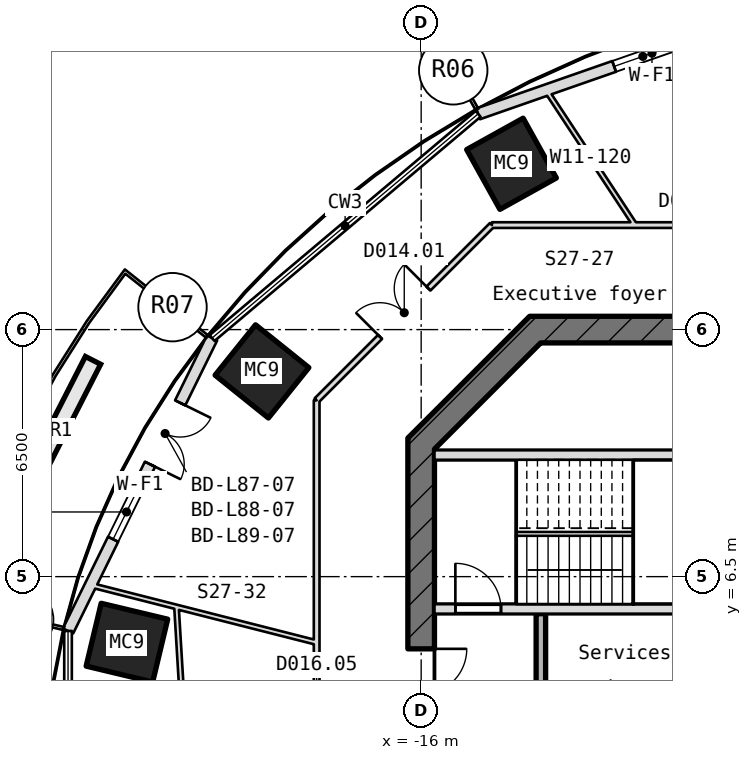
"""IFC4 building model, lengths in metres.
Left out: names, types, materials, properties, quantities, classifications, styles, units other than length and angle.
Written with IfcOpenShell. Run it as: python <this file> out.ifc"""

import sys

from ifc_helpers import new_model, si_unit, direction, frame, frame_2d, origin, origin_2d, place, context, subcontext, project, spatial, rectangle, hollow_rectangle, extrude, element, fill, save


model = new_model("IFC4")
c1 = context("Model", 3, precision=1e-05, world=origin(), true_north=direction((0.0, 1.0)))
c2 = subcontext(c1, "Body", "Model", "MODEL_VIEW")
j1 = project(units=[si_unit("LENGTHUNIT", "METRE"), si_unit("PLANEANGLEUNIT", "RADIAN")], contexts=[c1])
p1 = place(None, origin())
s1 = spatial("IfcSite", under=j1, at=p1, CompositionType="ELEMENT")
p2 = place(p1, origin())
s2 = spatial("IfcBuilding", under=s1, at=p2, CompositionType="ELEMENT")
p3 = place(p2, frame((0.0, 0.0, 384.1)))
s3 = spatial("IfcBuildingStorey", under=s2, at=p3, CompositionType="ELEMENT", Elevation=384.1)
for number, where, z_axis, x_axis in (
    (1, (-13.623, 17.363, -0.18), (0.0, 0.0, 1.0), (0.874, 0.486, 0.0)),
    (2, (-20.189, 11.9, -0.18), (0.0, 0.0, 1.0), (0.626, 0.78, 0.0)),
    (3, (-23.743, 4.763, -0.18), (0.0, 0.0, 1.0), (0.233, 0.973, 0.0)),
):
    element("IfcColumn", number, at=place(p3, frame(where, z_axis=z_axis, x_axis=x_axis)), inside=s3, PredefinedType="COLUMN", context=c2, shape_type="SweptSolid", body=[
        extrude(hollow_rectangle(XDim=1.7, YDim=1.8, WallThickness=0.05, at=origin_2d()), origin(), (0.0, 0.0, 1.0), 4.15),
    ])
p4 = place(p3, frame((-5.351, 21.869, 0.0), z_axis=(0.0, 0.0, 1.0), x_axis=(-0.944174121216, -0.329446852809, 0.0)))
e4 = element("IfcWall", 4, at=p4, inside=s3, PredefinedType="SOLIDWALL", context=c2, shape_type="SweptSolid", body=[
    extrude(rectangle(XDim=9.69, YDim=0.3, at=frame_2d((4.845, 0.0))), origin(), (0.0, 0.0, 1.0), 3.97),
])
p5 = place(p4, frame((1.9, 0.0, 0.0)))
e5 = element("IfcOpeningElement", 5, at=p5, cuts=e4, PredefinedType="OPENING", context=c2, shape_type="SweptSolid", body=[
    extrude(rectangle(XDim=1.8, YDim=2.4, at=frame_2d((0.9, 1.2))), frame((0.0, 0.16, 0.0), z_axis=(0.0, -1.0, 0.0), x_axis=(1.0, 0.0, 0.0)), (0.0, 0.0, 1.0), 0.32),
])
p6 = place(p4, frame((4.3, 0.0, 0.9)))
e6 = element("IfcOpeningElement", 6, at=p6, cuts=e4, PredefinedType="OPENING", context=c2, shape_type="SweptSolid", body=[
    extrude(rectangle(XDim=1.6, YDim=1.5, at=frame_2d((0.8, 0.75))), frame((0.0, 0.16, 0.0), z_axis=(0.0, -1.0, 0.0), x_axis=(1.0, 0.0, 0.0)), (0.0, 0.0, 1.0), 0.32),
])
p7 = place(p3, frame((-21.503, 12.778, 0.0), z_axis=(0.0, 0.0, 1.0), x_axis=(-0.441245353493, -0.897386504256, 0.0)))
e7 = element("IfcWall", 7, at=p7, inside=s3, PredefinedType="SOLIDWALL", context=c2, shape_type="SweptSolid", body=[
    extrude(rectangle(XDim=8.588, YDim=0.3, at=frame_2d((4.294, 0.0))), origin(), (0.0, 0.0, 1.0), 3.97),
])
p8 = place(p7, frame((1.9, 0.0, 0.0)))
e8 = element("IfcOpeningElement", 8, at=p8, cuts=e7, PredefinedType="OPENING", context=c2, shape_type="SweptSolid", body=[
    extrude(rectangle(XDim=1.8, YDim=2.4, at=frame_2d((0.9, 1.2))), frame((0.0, 0.16, 0.0), z_axis=(0.0, -1.0, 0.0), x_axis=(1.0, 0.0, 0.0)), (0.0, 0.0, 1.0), 0.32),
])
p9 = place(p7, frame((4.3, 0.0, 0.9)))
e9 = element("IfcOpeningElement", 9, at=p9, cuts=e7, PredefinedType="OPENING", context=c2, shape_type="SweptSolid", body=[
    extrude(rectangle(XDim=1.6, YDim=1.5, at=frame_2d((0.8, 0.75))), frame((0.0, 0.16, 0.0), z_axis=(0.0, -1.0, 0.0), x_axis=(1.0, 0.0, 0.0)), (0.0, 0.0, 1.0), 0.32),
])
p10 = place(p3, frame((13.145, 13.0, -0.18), z_axis=(0.0, 0.0, 1.0), x_axis=(-1.0, 0.0, 0.0)))
e10 = element("IfcWall", 10, at=p10, inside=s3, PredefinedType="SHEAR", context=c2, shape_type="SweptSolid", body=[
    extrude(rectangle(XDim=26.29, YDim=0.7, at=frame_2d((13.145, 0.0))), origin(), (0.0, 0.0, 1.0), 4.15),
])
p11 = place(p10, frame((21.073, 0.0, 0.18)))
e11 = element("IfcOpeningElement", 11, at=p11, cuts=e10, PredefinedType="OPENING", context=c2, shape_type="SweptSolid", body=[
    extrude(rectangle(XDim=1.0, YDim=2.1, at=frame_2d((0.5, 1.05))), frame((0.0, 0.36, 0.0), z_axis=(0.0, -1.0, 0.0), x_axis=(1.0, 0.0, 0.0)), (0.0, 0.0, 1.0), 0.72),
])
p12 = place(p10, frame((13.645, 0.0, 0.18)))
e12 = element("IfcOpeningElement", 12, at=p12, cuts=e10, PredefinedType="OPENING", context=c2, shape_type="SweptSolid", body=[
    extrude(rectangle(XDim=1.0, YDim=2.1, at=frame_2d((0.5, 1.05))), frame((0.0, 0.36, 0.0), z_axis=(0.0, -1.0, 0.0), x_axis=(1.0, 0.0, 0.0)), (0.0, 0.0, 1.0), 0.72),
])
p13 = place(p10, frame((7.395, 0.0, 0.18)))
e13 = element("IfcOpeningElement", 13, at=p13, cuts=e10, PredefinedType="OPENING", context=c2, shape_type="SweptSolid", body=[
    extrude(rectangle(XDim=1.0, YDim=2.1, at=frame_2d((0.5, 1.05))), frame((0.0, 0.36, 0.0), z_axis=(0.0, -1.0, 0.0), x_axis=(1.0, 0.0, 0.0)), (0.0, 0.0, 1.0), 0.72),
])
p14 = place(p10, frame((2.4, 0.0, 0.18)))
e14 = element("IfcOpeningElement", 14, at=p14, cuts=e10, PredefinedType="OPENING", context=c2, shape_type="SweptSolid", body=[
    extrude(rectangle(XDim=1.0, YDim=2.1, at=frame_2d((0.5, 1.05))), frame((0.0, 0.36, 0.0), z_axis=(0.0, -1.0, 0.0), x_axis=(1.0, 0.0, 0.0)), (0.0, 0.0, 1.0), 0.72),
])
p15 = place(p3, frame((-12.897, 13.103, -0.18), z_axis=(0.0, 0.0, 1.0), x_axis=(-0.707106781187, -0.707106781187, 0.0)))
e15 = element("IfcWall", 15, at=p15, inside=s3, PredefinedType="SHEAR", context=c2, shape_type="SweptSolid", body=[
    extrude(rectangle(XDim=4.533, YDim=0.7, at=frame_2d((2.266, 0.0))), origin(), (0.0, 0.0, 1.0), 4.15),
])
p16 = place(p3, frame((-16.0, 10.145, -0.18), z_axis=(0.0, 0.0, 1.0), x_axis=(0.0, -1.0, 0.0)))
e16 = element("IfcWall", 16, at=p16, inside=s3, PredefinedType="SHEAR", context=c2, shape_type="SweptSolid", body=[
    extrude(rectangle(XDim=20.29, YDim=0.7, at=frame_2d((10.145, 0.0))), origin(), (0.0, 0.0, 1.0), 4.15),
])
p17 = place(p16, frame((8.945, 0.0, 0.18)))
e17 = element("IfcOpeningElement", 17, at=p17, cuts=e16, PredefinedType="OPENING", context=c2, shape_type="SweptSolid", body=[
    extrude(rectangle(XDim=2.4, YDim=2.1, at=frame_2d((1.2, 1.05))), frame((0.0, 0.36, 0.0), z_axis=(0.0, -1.0, 0.0), x_axis=(1.0, 0.0, 0.0)), (0.0, 0.0, 1.0), 0.72),
])
p18 = place(p16, frame((5.545, 0.0, 0.18)))
e18 = element("IfcOpeningElement", 18, at=p18, cuts=e16, PredefinedType="OPENING", context=c2, shape_type="SweptSolid", body=[
    extrude(rectangle(XDim=1.2, YDim=2.1, at=frame_2d((0.6, 1.05))), frame((0.0, 0.36, 0.0), z_axis=(0.0, -1.0, 0.0), x_axis=(1.0, 0.0, 0.0)), (0.0, 0.0, 1.0), 0.72),
])
p19 = place(p3, frame((-15.65, 5.65, -0.18), z_axis=(0.0, 0.0, 1.0), x_axis=(1.0, 0.0, 0.0)))
e19 = element("IfcWall", 19, at=p19, inside=s3, PredefinedType="SHEAR", context=c2, shape_type="SweptSolid", body=[
    extrude(rectangle(XDim=7.1, YDim=0.25, at=frame_2d((3.55, 0.0))), origin(), (0.0, 0.0, 1.0), 4.15),
])
p20 = place(p19, frame((0.55, 0.0, 0.18)))
e20 = element("IfcOpeningElement", 20, at=p20, cuts=e19, PredefinedType="OPENING", context=c2, shape_type="SweptSolid", body=[
    extrude(rectangle(XDim=1.2, YDim=2.1, at=frame_2d((0.6, 1.05))), frame((0.0, 0.135, 0.0), z_axis=(0.0, -1.0, 0.0), x_axis=(1.0, 0.0, 0.0)), (0.0, 0.0, 1.0), 0.27),
])
p21 = place(p3, frame((-15.65, 9.7, -0.18), z_axis=(0.0, 0.0, 1.0), x_axis=(1.0, 0.0, 0.0)))
e21 = element("IfcWall", 21, at=p21, inside=s3, PredefinedType="SHEAR", context=c2, shape_type="SweptSolid", body=[
    extrude(rectangle(XDim=7.1, YDim=0.25, at=frame_2d((3.55, 0.0))), origin(), (0.0, 0.0, 1.0), 4.15),
])
p22 = place(p3, frame((-12.85, 2.475, 0.0), z_axis=(0.0, 0.0, 1.0), x_axis=(0.0, 1.0, 0.0)))
e22 = element("IfcWall", 22, at=p22, inside=s3, PredefinedType="STANDARD", context=c2, shape_type="SweptSolid", body=[
    extrude(rectangle(XDim=3.05, YDim=0.25, at=frame_2d((1.525, 0.0))), origin(), (0.0, 0.0, 1.0), 3.97),
])
p23 = place(p3, frame((-22.438, 5.703, 0.0), z_axis=(0.0, 0.0, 1.0), x_axis=(0.060251539716, -0.998183225646, 0.0)))
e23 = element("IfcWall", 23, at=p23, inside=s3, PredefinedType="PARTITIONING", context=c2, shape_type="SweptSolid", body=[
    extrude(rectangle(XDim=8.112, YDim=0.12, at=frame_2d((4.056, 0.0))), origin(), (0.0, 0.0, 1.0), 3.97),
])
p24 = place(p3, frame((-18.75, -11.139, 0.0), z_axis=(0.0, 0.0, 1.0), x_axis=(0.0, 1.0, 0.0)))
e24 = element("IfcWall", 24, at=p24, inside=s3, PredefinedType="PARTITIONING", context=c2, shape_type="SweptSolid", body=[
    extrude(rectangle(XDim=22.278, YDim=0.15, at=frame_2d((11.139, 0.0))), origin(), (0.0, 0.0, 1.0), 3.97),
])
p25 = place(p24, frame((13.745, 0.0, 0.0)))
e25 = element("IfcOpeningElement", 25, at=p25, cuts=e24, PredefinedType="OPENING", context=c2, shape_type="SweptSolid", body=[
    extrude(rectangle(XDim=0.95, YDim=2.1, at=frame_2d((0.475, 1.05))), frame((0.0, 0.085, 0.0), z_axis=(0.0, -1.0, 0.0), x_axis=(1.0, 0.0, 0.0)), (0.0, 0.0, 1.0), 0.17),
])
p26 = place(p24, frame((10.34, 0.0, 0.0)))
e26 = element("IfcOpeningElement", 26, at=p26, cuts=e24, PredefinedType="OPENING", context=c2, shape_type="SweptSolid", body=[
    extrude(rectangle(XDim=0.95, YDim=2.1, at=frame_2d((0.475, 1.05))), frame((0.0, 0.085, 0.0), z_axis=(0.0, -1.0, 0.0), x_axis=(1.0, 0.0, 0.0)), (0.0, 0.0, 1.0), 0.17),
])
p27 = place(p3, frame((-18.75, 4.765, 0.0), z_axis=(0.0, 0.0, 1.0), x_axis=(-0.969189937919, 0.246314563589, 0.0)))
e27 = element("IfcWall", 27, at=p27, inside=s3, PredefinedType="PARTITIONING", context=c2, shape_type="SweptSolid", body=[
    extrude(rectangle(XDim=6.138, YDim=0.12, at=frame_2d((3.069, 0.0))), origin(), (0.0, 0.0, 1.0), 3.97),
])
p28 = place(p3, frame((-18.75, 11.139, 0.0), z_axis=(0.0, 0.0, 1.0), x_axis=(0.707106781187, 0.707106781187, 0.0)))
e28 = element("IfcWall", 28, at=p28, inside=s3, PredefinedType="PARTITIONING", context=c2, shape_type="SweptSolid", body=[
    extrude(rectangle(XDim=6.521, YDim=0.15, at=frame_2d((3.26, 0.0))), origin(), (0.0, 0.0, 1.0), 3.97),
])
p29 = place(p28, frame((2.36, 0.0, 0.0)))
e29 = element("IfcOpeningElement", 29, at=p29, cuts=e28, PredefinedType="OPENING", context=c2, shape_type="SweptSolid", body=[
    extrude(rectangle(XDim=1.8, YDim=2.1, at=frame_2d((0.9, 1.05))), frame((0.0, 0.085, 0.0), z_axis=(0.0, -1.0, 0.0), x_axis=(1.0, 0.0, 0.0)), (0.0, 0.0, 1.0), 0.17),
])
p30 = place(p3, frame((-14.139, 15.75, 0.0), z_axis=(0.0, 0.0, 1.0), x_axis=(1.0, 0.0, 0.0)))
e30 = element("IfcWall", 30, at=p30, inside=s3, PredefinedType="PARTITIONING", context=c2, shape_type="SweptSolid", body=[
    extrude(rectangle(XDim=28.278, YDim=0.15, at=frame_2d((14.139, 0.0))), origin(), (0.0, 0.0, 1.0), 3.97),
])
p31 = place(p30, frame((15.871, 0.0, 0.0)))
e31 = element("IfcOpeningElement", 31, at=p31, cuts=e30, PredefinedType="OPENING", context=c2, shape_type="SweptSolid", body=[
    extrude(rectangle(XDim=0.95, YDim=2.1, at=frame_2d((0.475, 1.05))), frame((0.0, 0.085, 0.0), z_axis=(0.0, -1.0, 0.0), x_axis=(1.0, 0.0, 0.0)), (0.0, 0.0, 1.0), 0.17),
])
p32 = place(p30, frame((10.022, 0.0, 0.0)))
e32 = element("IfcOpeningElement", 32, at=p32, cuts=e30, PredefinedType="OPENING", context=c2, shape_type="SweptSolid", body=[
    extrude(rectangle(XDim=0.95, YDim=2.1, at=frame_2d((0.475, 1.05))), frame((0.0, 0.085, 0.0), z_axis=(0.0, -1.0, 0.0), x_axis=(1.0, 0.0, 0.0)), (0.0, 0.0, 1.0), 0.17),
])
p33 = place(p30, frame((4.98, 0.0, 0.0)))
e33 = element("IfcOpeningElement", 33, at=p33, cuts=e30, PredefinedType="OPENING", context=c2, shape_type="SweptSolid", body=[
    extrude(rectangle(XDim=0.95, YDim=2.1, at=frame_2d((0.475, 1.05))), frame((0.0, 0.085, 0.0), z_axis=(0.0, -1.0, 0.0), x_axis=(1.0, 0.0, 0.0)), (0.0, 0.0, 1.0), 0.17),
])
p34 = place(p3, frame((-10.373, 15.75, 0.0), z_axis=(0.0, 0.0, 1.0), x_axis=(-0.550014013295, 0.835155425762, 0.0)))
e34 = element("IfcWall", 34, at=p34, inside=s3, PredefinedType="PARTITIONING", context=c2, shape_type="SweptSolid", body=[
    extrude(rectangle(XDim=4.252, YDim=0.12, at=frame_2d((2.126, 0.0))), origin(), (0.0, 0.0, 1.0), 3.97),
])
p35 = place(p6, origin())
e35 = element("IfcWindow", 35, at=p35, inside=s3, PartitioningType="SINGLE_PANEL", PredefinedType="WINDOW", context=c2, shape_type="SweptSolid", body=[
    extrude(rectangle(XDim=1.6, YDim=1.5, at=frame_2d((0.8, 0.75))), frame((0.0, 0.03, 0.0), z_axis=(0.0, -1.0, 0.0), x_axis=(1.0, 0.0, 0.0)), (0.0, 0.0, 1.0), 0.06),
])
fill(e6, e35)
p36 = place(p8, origin())
e36 = element("IfcDoor", 36, at=p36, inside=s3, OperationType="SINGLE_SWING_LEFT", PredefinedType="DOOR", context=c2, shape_type="SweptSolid", body=[
    extrude(rectangle(XDim=1.8, YDim=2.4, at=frame_2d((0.9, 1.2))), frame((0.0, 0.025, 0.0), z_axis=(0.0, -1.0, 0.0), x_axis=(1.0, 0.0, 0.0)), (0.0, 0.0, 1.0), 0.05),
])
fill(e8, e36)
p37 = place(p9, origin())
e37 = element("IfcWindow", 37, at=p37, inside=s3, PartitioningType="SINGLE_PANEL", PredefinedType="WINDOW", context=c2, shape_type="SweptSolid", body=[
    extrude(rectangle(XDim=1.6, YDim=1.5, at=frame_2d((0.8, 0.75))), frame((0.0, 0.03, 0.0), z_axis=(0.0, -1.0, 0.0), x_axis=(1.0, 0.0, 0.0)), (0.0, 0.0, 1.0), 0.06),
])
fill(e9, e37)
p38 = place(p20, origin())
e38 = element("IfcDoor", 38, at=p38, inside=s3, OperationType="SINGLE_SWING_RIGHT", PredefinedType="DOOR", context=c2, shape_type="SweptSolid", body=[
    extrude(rectangle(XDim=1.2, YDim=2.1, at=frame_2d((0.6, 1.05))), frame((0.0, 0.025, 0.0), z_axis=(0.0, -1.0, 0.0), x_axis=(1.0, 0.0, 0.0)), (0.0, 0.0, 1.0), 0.05),
])
fill(e20, e38)
p39 = place(p18, origin())
e39 = element("IfcDoor", 39, at=p39, inside=s3, OperationType="SINGLE_SWING_RIGHT", PredefinedType="DOOR", context=c2, shape_type="SweptSolid", body=[
    extrude(rectangle(XDim=1.2, YDim=2.1, at=frame_2d((0.6, 1.05))), frame((0.0, 0.025, 0.0), z_axis=(0.0, -1.0, 0.0), x_axis=(1.0, 0.0, 0.0)), (0.0, 0.0, 1.0), 0.05),
])
fill(e18, e39)
p40 = place(p29, origin())
e40 = element("IfcDoor", 40, at=p40, inside=s3, OperationType="DOUBLE_DOOR_SINGLE_SWING", PredefinedType="DOOR", context=c2, shape_type="SweptSolid", body=[
    extrude(rectangle(XDim=1.8, YDim=2.1, at=frame_2d((0.9, 1.05))), frame((0.0, 0.025, 0.0), z_axis=(0.0, -1.0, 0.0), x_axis=(1.0, 0.0, 0.0)), (0.0, 0.0, 1.0), 0.05),
])
fill(e29, e40)
save(model, sys.argv[1])
